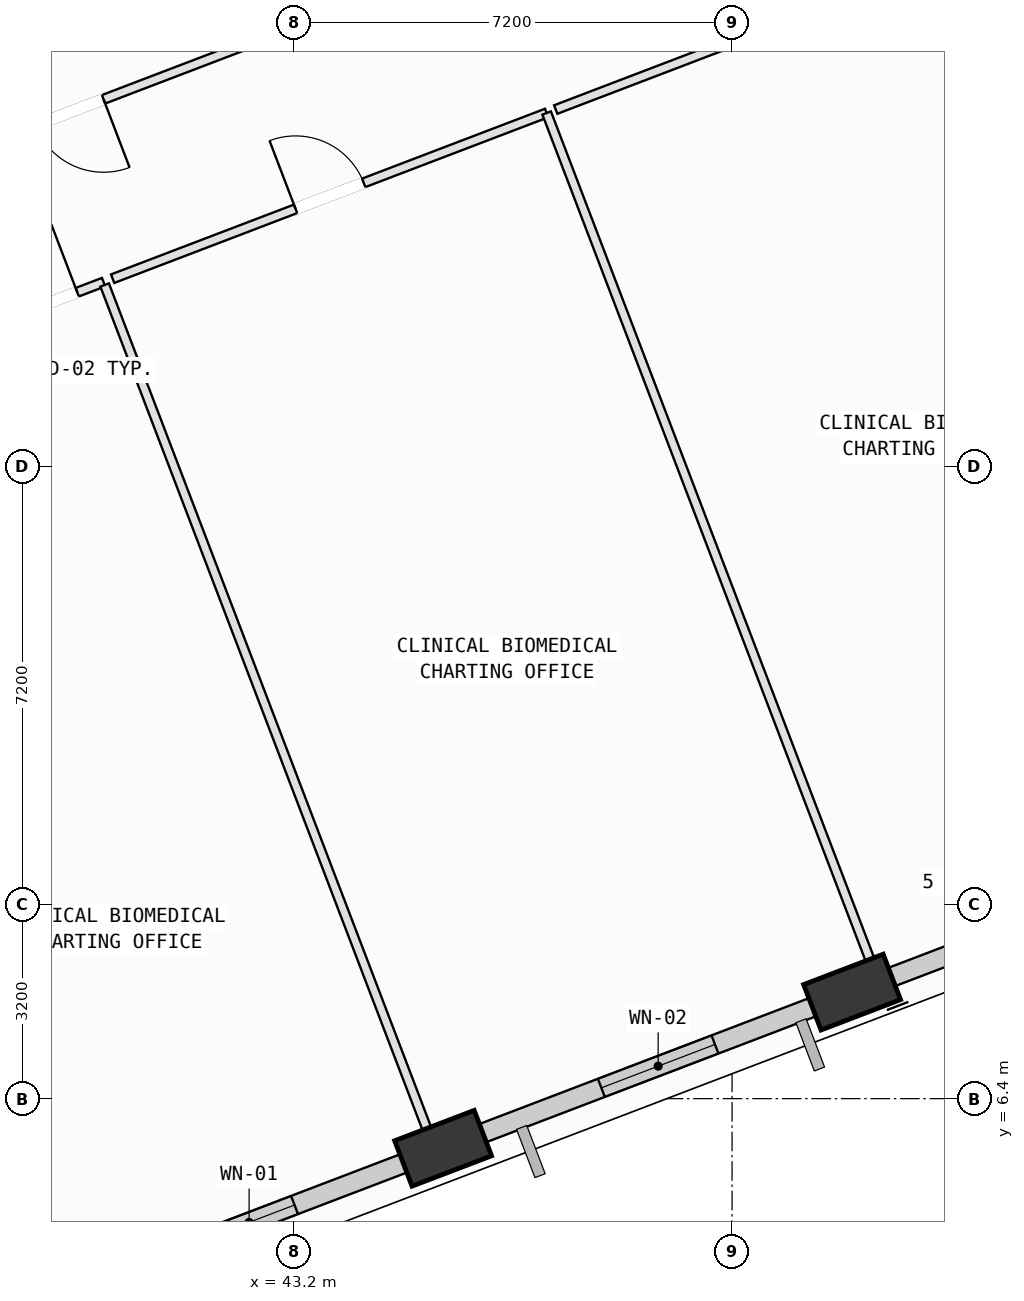
"""IFC4 building model, lengths in metres.
Left out: names, types, materials, properties, quantities, classifications, styles, units other than length and angle.
Written with IfcOpenShell. Run it as: python <this file> out.ifc"""

import sys

from ifc_helpers import new_model, si_unit, direction, frame, frame_2d, origin, origin_2d, place, context, subcontext, project, spatial, rectangle, extrude, element, fill, save


model = new_model("IFC4")
c1 = context("Model", 3, precision=1e-05, world=origin(), true_north=direction((0.0, 1.0)))
c2 = subcontext(c1, "Body", "Model", "MODEL_VIEW")
j1 = project(units=[si_unit("LENGTHUNIT", "METRE"), si_unit("PLANEANGLEUNIT", "RADIAN")], contexts=[c1])
p1 = place(None, origin())
s1 = spatial("IfcSite", under=j1, at=p1, CompositionType="ELEMENT")
p2 = place(p1, origin())
s2 = spatial("IfcBuilding", under=s1, at=p2, CompositionType="ELEMENT")
p3 = place(p2, frame((0.0, 0.0, 112.4)))
s3 = spatial("IfcBuildingStorey", under=s2, at=p3, CompositionType="ELEMENT", Elevation=112.4)
p4 = place(p3, frame((45.648, 5.584, 0.002), z_axis=(0.078947790849, 0.050361148554, 0.995605846225), x_axis=(-0.801849419572, 0.596591609047, 0.033405992688)))
e1 = element("IfcColumn", 1, at=p4, inside=s3, PredefinedType="COLUMN", context=c2, shape_type="SweptSolid", body=[
    extrude(rectangle(XDim=1.4, YDim=0.8, at=origin_2d()), origin(), (0.0, 0.0, 1.0), 4.014),
])
p5 = place(p3, frame((52.374, 8.152, 0.002), z_axis=(0.067994181617, 0.077959369986, 0.994635173266), x_axis=(-0.93727055229, 0.346644050033, 0.03690276937)))
e2 = element("IfcColumn", 2, at=p5, inside=s3, PredefinedType="COLUMN", context=c2, shape_type="SweptSolid", body=[
    extrude(rectangle(XDim=1.4, YDim=0.8, at=origin_2d()), origin(), (0.0, 0.0, 1.0), 4.018),
])
p6 = place(p3, frame((45.358, 5.473, 0.0), z_axis=(0.0, 0.0, 1.0), x_axis=(-0.934195274734, -0.356762089724, 0.0)))
e3 = element("IfcWall", 3, at=p6, inside=s3, PredefinedType="SOLIDWALL", context=c2, shape_type="SweptSolid", body=[
    extrude(rectangle(XDim=6.209, YDim=0.32, at=frame_2d((3.104, 0.0))), origin(), (0.0, 0.0, 1.0), 3.165),
])
p7 = place(p6, frame((2.305, 0.0, 0.75)))
e4 = element("IfcOpeningElement", 4, at=p7, cuts=e3, PredefinedType="OPENING", context=c2, shape_type="SweptSolid", body=[
    extrude(rectangle(XDim=1.6, YDim=1.95, at=frame_2d((0.8, 0.975))), frame((0.0, 0.17, 0.0), z_axis=(0.0, -1.0, 0.0), x_axis=(1.0, 0.0, 0.0)), (0.0, 0.0, 1.0), 0.34),
])
p8 = place(p3, frame((52.091, 8.044, 0.0), z_axis=(0.0, 0.0, 1.0), x_axis=(-0.93419197885, -0.356770720005, 0.0)))
e5 = element("IfcWall", 5, at=p8, inside=s3, PredefinedType="SOLIDWALL", context=c2, shape_type="SweptSolid", body=[
    extrude(rectangle(XDim=6.218, YDim=0.32, at=frame_2d((3.109, 0.0))), origin(), (0.0, 0.0, 1.0), 3.165),
])
p9 = place(p8, frame((2.111, 0.0, 0.75)))
e6 = element("IfcOpeningElement", 6, at=p9, cuts=e5, PredefinedType="OPENING", context=c2, shape_type="SweptSolid", body=[
    extrude(rectangle(XDim=2.0, YDim=1.95, at=frame_2d((1.0, 0.975))), frame((0.0, 0.17, 0.0), z_axis=(0.0, -1.0, 0.0), x_axis=(1.0, 0.0, 0.0)), (0.0, 0.0, 1.0), 0.34),
])
p10 = place(p3, frame((58.832, 10.618, 0.0), z_axis=(0.0, 0.0, 1.0), x_axis=(-0.934193739587, -0.356766109541, 0.0)))
e7 = element("IfcWall", 7, at=p10, inside=s3, PredefinedType="SOLIDWALL", context=c2, shape_type="SweptSolid", body=[
    extrude(rectangle(XDim=6.242, YDim=0.32, at=frame_2d((3.121, 0.0))), origin(), (0.0, 0.0, 1.0), 3.165),
])
p11 = place(p10, frame((3.34, 0.0, 0.75)))
e8 = element("IfcOpeningElement", 8, at=p11, cuts=e7, PredefinedType="OPENING", context=c2, shape_type="SweptSolid", body=[
    extrude(rectangle(XDim=1.4, YDim=1.85, at=frame_2d((0.7, 0.925))), frame((0.0, 0.17, 0.0), z_axis=(0.0, -1.0, 0.0), x_axis=(1.0, 0.0, 0.0)), (0.0, 0.0, 1.0), 0.34),
])
p12 = place(p3, frame((54.0, 30.803, 0.0), z_axis=(0.0, 0.0, 1.0), x_axis=(0.495311670918, -0.868715343857, 0.0)))
e9 = element("IfcWall", 9, at=p12, inside=s3, PredefinedType="SOLIDWALL", context=c2, shape_type="SweptSolid", body=[
    extrude(rectangle(XDim=8.838, YDim=0.32, at=frame_2d((4.419, 0.0))), origin(), (0.0, 0.0, 1.0), 3.165),
])
p13 = place(p3, frame((38.077, 19.07, 0.0), z_axis=(0.0, 0.0, 1.0), x_axis=(0.934165524449, 0.356839982248, 0.0)))
e10 = element("IfcWall", 10, at=p13, inside=s3, PredefinedType="PARTITIONING", context=c2, shape_type="SweptSolid", body=[
    extrude(rectangle(XDim=2.127, YDim=0.15, at=frame_2d((1.063, 0.0))), origin(), (0.0, 0.0, 1.0), 2.945),
])
p14 = place(p13, frame((0.463, 0.0, 0.0)))
e11 = element("IfcOpeningElement", 11, at=p14, cuts=e10, PredefinedType="OPENING", context=c2, shape_type="SweptSolid", body=[
    extrude(rectangle(XDim=1.2, YDim=2.15, at=frame_2d((0.6, 1.075))), frame((0.0, 0.085, 0.0), z_axis=(0.0, -1.0, 0.0), x_axis=(1.0, 0.0, 0.0)), (0.0, 0.0, 1.0), 0.17),
])
p15 = place(p3, frame((40.082, 19.782, 0.0), z_axis=(0.0, 0.0, 1.0), x_axis=(0.356731098137, -0.934207109597, 0.0)))
e12 = element("IfcWall", 12, at=p15, inside=s3, PredefinedType="PARTITIONING", context=c2, shape_type="SweptSolid", body=[
    extrude(rectangle(XDim=15.479, YDim=0.15, at=frame_2d((7.74, 0.0))), origin(), (0.0, 0.0, 1.0), 3.78),
])
p16 = place(p3, frame((40.213, 19.886, 0.0), z_axis=(0.0, 0.0, 1.0), x_axis=(0.93423542168, 0.356656945646, 0.0)))
e13 = element("IfcWall", 13, at=p16, inside=s3, PredefinedType="PARTITIONING", context=c2, shape_type="SweptSolid", body=[
    extrude(rectangle(XDim=7.641, YDim=0.15, at=frame_2d((3.82, 0.0))), origin(), (0.0, 0.0, 1.0), 3.78),
])
p17 = place(p16, frame((3.22, 0.0, 0.0)))
e14 = element("IfcOpeningElement", 14, at=p17, cuts=e13, PredefinedType="OPENING", context=c2, shape_type="SweptSolid", body=[
    extrude(rectangle(XDim=1.2, YDim=2.15, at=frame_2d((0.6, 1.075))), frame((0.0, 0.085, 0.0), z_axis=(0.0, -1.0, 0.0), x_axis=(1.0, 0.0, 0.0)), (0.0, 0.0, 1.0), 0.17),
])
p18 = place(p3, frame((47.351, 22.611, 0.0), z_axis=(0.0, 0.0, 1.0), x_axis=(0.356735243001, -0.934205526852, 0.0)))
e15 = element("IfcWall", 15, at=p18, inside=s3, PredefinedType="PARTITIONING", context=c2, shape_type="SweptSolid", body=[
    extrude(rectangle(XDim=15.53, YDim=0.15, at=frame_2d((7.765, 0.0))), origin(), (0.0, 0.0, 1.0), 3.78),
])
p19 = place(p3, frame((52.891, 8.103, 0.0), z_axis=(0.0, 0.0, 1.0), x_axis=(-0.934316516535, -0.356444451395, 0.0)))
e16 = element("IfcWall", 16, at=p19, inside=s3, PredefinedType="PARTITIONING", context=c2, shape_type="SweptSolid", body=[
    extrude(rectangle(XDim=0.769, YDim=0.15, at=frame_2d((0.384, 0.0))), origin(), (0.0, 0.0, 1.0), 3.165),
])
p20 = place(p3, frame((46.364, 5.611, 0.0), z_axis=(0.0, 0.0, 1.0), x_axis=(-0.934304300347, -0.356476470967, 0.0)))
e17 = element("IfcWall", 17, at=p20, inside=s3, PredefinedType="PARTITIONING", context=c2, shape_type="SweptSolid", body=[
    extrude(rectangle(XDim=0.654, YDim=0.15, at=frame_2d((0.327, 0.0))), origin(), (0.0, 0.0, 1.0), 3.165),
])
p21 = place(p3, frame((47.5, 22.668, 0.0), z_axis=(0.0, 0.0, 1.0), x_axis=(0.934172491121, 0.356821743778, 0.0)))
e18 = element("IfcWall", 18, at=p21, inside=s3, PredefinedType="PARTITIONING", context=c2, shape_type="SweptSolid", body=[
    extrude(rectangle(XDim=7.64, YDim=0.15, at=frame_2d((3.82, 0.0))), origin(), (0.0, 0.0, 1.0), 3.78),
])
p22 = place(p21, frame((3.22, 0.0, 0.0)))
e19 = element("IfcOpeningElement", 19, at=p22, cuts=e18, PredefinedType="OPENING", context=c2, shape_type="SweptSolid", body=[
    extrude(rectangle(XDim=1.2, YDim=2.15, at=frame_2d((0.6, 1.075))), frame((0.0, 0.085, 0.0), z_axis=(0.0, -1.0, 0.0), x_axis=(1.0, 0.0, 0.0)), (0.0, 0.0, 1.0), 0.17),
])
p23 = place(p3, frame((44.852, 24.665, 0.0), z_axis=(0.0, 0.0, 1.0), x_axis=(-0.934210506375, -0.35672220253, 0.0)))
e20 = element("IfcWall", 20, at=p23, inside=s3, PredefinedType="PARTITIONING", context=c2, shape_type="SweptSolid", body=[
    extrude(rectangle(XDim=11.451, YDim=0.15, at=frame_2d((5.726, 0.0))), origin(), (0.0, 0.0, 1.0), 2.945),
])
p24 = place(p23, frame((5.126, 0.0, 0.0)))
e21 = element("IfcOpeningElement", 21, at=p24, cuts=e20, PredefinedType="OPENING", context=c2, shape_type="SweptSolid", body=[
    extrude(rectangle(XDim=1.2, YDim=2.15, at=frame_2d((0.6, 1.075))), frame((0.0, 0.085, 0.0), z_axis=(0.0, -1.0, 0.0), x_axis=(1.0, 0.0, 0.0)), (0.0, 0.0, 1.0), 0.17),
])
p25 = place(p7, origin())
e22 = element("IfcWindow", 22, at=p25, inside=s3, PartitioningType="SINGLE_PANEL", PredefinedType="WINDOW", context=c2, shape_type="SweptSolid", body=[
    extrude(rectangle(XDim=1.6, YDim=1.95, at=frame_2d((0.8, 0.975))), frame((0.0, 0.03, 0.0), z_axis=(0.0, -1.0, 0.0), x_axis=(1.0, 0.0, 0.0)), (0.0, 0.0, 1.0), 0.06),
])
fill(e4, e22)
p26 = place(p9, origin())
e23 = element("IfcWindow", 23, at=p26, inside=s3, PartitioningType="SINGLE_PANEL", PredefinedType="WINDOW", context=c2, shape_type="SweptSolid", body=[
    extrude(rectangle(XDim=2.0, YDim=1.95, at=frame_2d((1.0, 0.975))), frame((0.0, 0.03, 0.0), z_axis=(0.0, -1.0, 0.0), x_axis=(1.0, 0.0, 0.0)), (0.0, 0.0, 1.0), 0.06),
])
fill(e6, e23)
p27 = place(p14, origin())
e24 = element("IfcDoor", 24, at=p27, inside=s3, OperationType="SINGLE_SWING_RIGHT", PredefinedType="DOOR", context=c2, shape_type="SweptSolid", body=[
    extrude(rectangle(XDim=1.2, YDim=2.15, at=frame_2d((0.6, 1.075))), frame((0.0, 0.025, 0.0), z_axis=(0.0, -1.0, 0.0), x_axis=(1.0, 0.0, 0.0)), (0.0, 0.0, 1.0), 0.05),
])
fill(e11, e24)
p28 = place(p17, origin())
e25 = element("IfcDoor", 25, at=p28, inside=s3, OperationType="SINGLE_SWING_LEFT", PredefinedType="DOOR", context=c2, shape_type="SweptSolid", body=[
    extrude(rectangle(XDim=1.2, YDim=2.15, at=frame_2d((0.6, 1.075))), frame((0.0, 0.025, 0.0), z_axis=(0.0, -1.0, 0.0), x_axis=(1.0, 0.0, 0.0)), (0.0, 0.0, 1.0), 0.05),
])
fill(e14, e25)
p29 = place(p24, origin())
e26 = element("IfcDoor", 26, at=p29, inside=s3, OperationType="SINGLE_SWING_LEFT", PredefinedType="DOOR", context=c2, shape_type="SweptSolid", body=[
    extrude(rectangle(XDim=1.2, YDim=2.15, at=frame_2d((0.6, 1.075))), frame((0.0, 0.025, 0.0), z_axis=(0.0, -1.0, 0.0), x_axis=(1.0, 0.0, 0.0)), (0.0, 0.0, 1.0), 0.05),
])
fill(e21, e26)
save(model, sys.argv[1])
